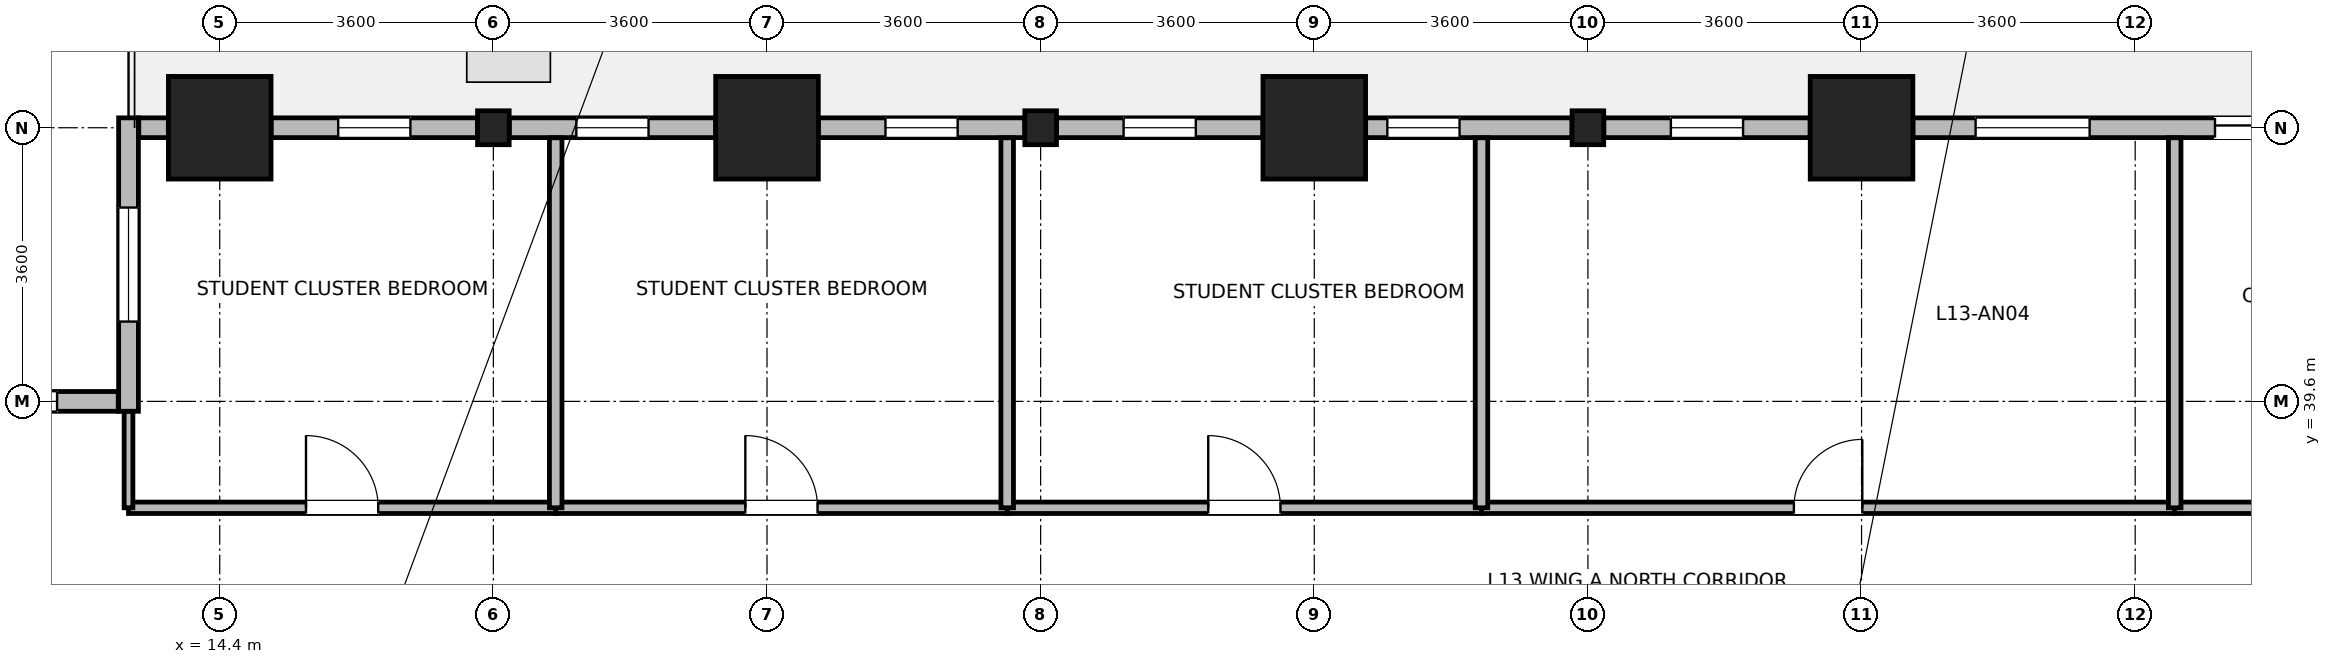
"""IFC4 building model, lengths in metres.
Left out: names, types, materials, properties, quantities, classifications, styles, units other than length and angle.
Written with IfcOpenShell. Run it as: python <this file> out.ifc"""

import sys

from ifc_helpers import new_model, si_unit, direction, frame, frame_2d, origin, origin_2d, place, context, subcontext, project, spatial, rectangle, i_section, extrude, source, transform, mapped, element, fill, save


model = new_model("IFC4")
c1 = context("Model", 3, precision=1e-05, world=origin(), true_north=direction((0.0, 1.0)))
c2 = subcontext(c1, "Body", "Model", "MODEL_VIEW")
j1 = project(units=[si_unit("LENGTHUNIT", "METRE"), si_unit("PLANEANGLEUNIT", "RADIAN")], contexts=[c1])
p1 = place(None, origin())
s1 = spatial("IfcSite", under=j1, at=p1, CompositionType="ELEMENT")
p2 = place(p1, origin())
s2 = spatial("IfcBuilding", under=s1, at=p2, CompositionType="ELEMENT")
p3 = place(p2, frame((0.0, 0.0, 54.9)))
s3 = spatial("IfcBuildingStorey", under=s2, at=p3, CompositionType="ELEMENT", Elevation=54.9)
m1 = source(origin(), c2, "Body", "SweptSolid", [
    extrude(rectangle(XDim=1.35, YDim=1.35, at=origin_2d()), origin(), (0.0, 0.0, 1.0), 3.7),
])
for number, where, z_axis, x_axis in (
    (1, (14.4, 43.2, 0.0), (0.0, 0.0, 1.0), (1.0, 0.0, 0.0)),
    (2, (21.6, 43.2, 0.0), (0.0, 0.0, 1.0), (1.0, 0.0, 0.0)),
    (3, (28.8, 43.2, 0.0), (0.0, 0.0, 1.0), (1.0, 0.0, 0.0)),
    (4, (36.0, 43.2, 0.0), (0.0, 0.0, 1.0), (1.0, 0.0, 0.0)),
):
    element("IfcColumn", number, at=place(p3, frame(where, z_axis=z_axis, x_axis=x_axis)), inside=s3, PredefinedType="COLUMN", context=c2, shape_type="MappedRepresentation", body=[
        mapped(m1, transform((0.0, 0.0, 0.0), x_axis=(1.0, 0.0, 0.0), y_axis=(0.0, 1.0, 0.0), z_axis=(0.0, 0.0, 1.0), scale=1.0)),
    ])
m2 = source(origin(), c2, "Body", "SweptSolid", [
    extrude(i_section(OverallWidth=0.416, OverallDepth=0.446, WebThickness=0.029, FlangeThickness=0.04, FilletRadius=0.015, at=origin_2d()), origin(), (0.0, 0.0, 1.0), 3.7),
])
for number, where, z_axis, x_axis in (
    (5, (18.0, 43.2, 0.0), (0.0, 0.0, 1.0), (1.0, 0.0, 0.0)),
    (6, (25.2, 43.2, 0.0), (0.0, 0.0, 1.0), (1.0, 0.0, 0.0)),
    (7, (32.4, 43.2, 0.0), (0.0, 0.0, 1.0), (1.0, 0.0, 0.0)),
):
    element("IfcColumn", number, at=place(p3, frame(where, z_axis=z_axis, x_axis=x_axis)), inside=s3, PredefinedType="COLUMN", context=c2, shape_type="MappedRepresentation", body=[
        mapped(m2, transform((0.0, 0.0, 0.0), x_axis=(1.0, 0.0, 0.0), y_axis=(0.0, 1.0, 0.0), z_axis=(0.0, 0.0, 1.0), scale=1.0)),
    ])
p4 = place(p3, frame((36.676, 43.2, 0.0), z_axis=(0.0, 0.0, 1.0), x_axis=(1.0, 0.0, 0.0)))
e8 = element("IfcWall", 8, at=p4, inside=s3, PredefinedType="STANDARD", context=c2, shape_type="SweptSolid", body=[
    extrude(rectangle(XDim=9.448, YDim=0.26, at=frame_2d((4.724, 0.0))), origin(), (0.0, 0.0, 1.0), 2.93),
])
p5 = place(p4, frame((3.974, 0.0, 0.0)))
e9 = element("IfcOpeningElement", 9, at=p5, cuts=e8, PredefinedType="OPENING", context=c2, shape_type="SweptSolid", body=[
    extrude(rectangle(XDim=1.5, YDim=2.15, at=frame_2d((0.75, 1.075))), frame((0.0, 0.14, 0.0), z_axis=(0.0, -1.0, 0.0), x_axis=(1.0, 0.0, 0.0)), (0.0, 0.0, 1.0), 0.28),
])
p6 = place(p4, frame((0.825, 0.0, 0.85)))
e10 = element("IfcOpeningElement", 10, at=p6, cuts=e8, PredefinedType="OPENING", context=c2, shape_type="SweptSolid", body=[
    extrude(rectangle(XDim=1.5, YDim=1.85, at=frame_2d((0.75, 0.925))), frame((0.0, 0.14, 0.0), z_axis=(0.0, -1.0, 0.0), x_axis=(1.0, 0.0, 0.0)), (0.0, 0.0, 1.0), 0.28),
])
p7 = place(p4, frame((7.123, 0.0, 0.85)))
e11 = element("IfcOpeningElement", 11, at=p7, cuts=e8, PredefinedType="OPENING", context=c2, shape_type="SweptSolid", body=[
    extrude(rectangle(XDim=1.5, YDim=1.85, at=frame_2d((0.75, 0.925))), frame((0.0, 0.14, 0.0), z_axis=(0.0, -1.0, 0.0), x_axis=(1.0, 0.0, 0.0)), (0.0, 0.0, 1.0), 0.28),
])
p8 = place(p3, frame((32.609, 43.2, 0.0), z_axis=(0.0, 0.0, 1.0), x_axis=(1.0, 0.0, 0.0)))
e12 = element("IfcWall", 12, at=p8, inside=s3, PredefinedType="STANDARD", context=c2, shape_type="SweptSolid", body=[
    extrude(rectangle(XDim=2.715, YDim=0.26, at=frame_2d((1.357, 0.0))), origin(), (0.0, 0.0, 1.0), 2.93),
])
p9 = place(p8, frame((0.883, 0.0, 0.85)))
e13 = element("IfcOpeningElement", 13, at=p9, cuts=e12, PredefinedType="OPENING", context=c2, shape_type="SweptSolid", body=[
    extrude(rectangle(XDim=0.95, YDim=1.75, at=frame_2d((0.475, 0.875))), frame((0.0, 0.14, 0.0), z_axis=(0.0, -1.0, 0.0), x_axis=(1.0, 0.0, 0.0)), (0.0, 0.0, 1.0), 0.28),
])
p10 = place(p3, frame((29.476, 43.2, 0.0), z_axis=(0.0, 0.0, 1.0), x_axis=(1.0, 0.0, 0.0)))
e14 = element("IfcWall", 14, at=p10, inside=s3, PredefinedType="STANDARD", context=c2, shape_type="SweptSolid", body=[
    extrude(rectangle(XDim=2.715, YDim=0.26, at=frame_2d((1.357, 0.0))), origin(), (0.0, 0.0, 1.0), 2.93),
])
p11 = place(p10, frame((0.285, 0.0, 0.85)))
e15 = element("IfcOpeningElement", 15, at=p11, cuts=e14, PredefinedType="OPENING", context=c2, shape_type="SweptSolid", body=[
    extrude(rectangle(XDim=0.95, YDim=1.75, at=frame_2d((0.475, 0.875))), frame((0.0, 0.14, 0.0), z_axis=(0.0, -1.0, 0.0), x_axis=(1.0, 0.0, 0.0)), (0.0, 0.0, 1.0), 0.28),
])
p12 = place(p3, frame((25.409, 43.2, 0.0), z_axis=(0.0, 0.0, 1.0), x_axis=(1.0, 0.0, 0.0)))
e16 = element("IfcWall", 16, at=p12, inside=s3, PredefinedType="STANDARD", context=c2, shape_type="SweptSolid", body=[
    extrude(rectangle(XDim=2.715, YDim=0.26, at=frame_2d((1.357, 0.0))), origin(), (0.0, 0.0, 1.0), 2.93),
])
p13 = place(p12, frame((0.883, 0.0, 0.85)))
e17 = element("IfcOpeningElement", 17, at=p13, cuts=e16, PredefinedType="OPENING", context=c2, shape_type="SweptSolid", body=[
    extrude(rectangle(XDim=0.95, YDim=1.75, at=frame_2d((0.475, 0.875))), frame((0.0, 0.14, 0.0), z_axis=(0.0, -1.0, 0.0), x_axis=(1.0, 0.0, 0.0)), (0.0, 0.0, 1.0), 0.28),
])
p14 = place(p3, frame((22.276, 43.2, 0.0), z_axis=(0.0, 0.0, 1.0), x_axis=(1.0, 0.0, 0.0)))
e18 = element("IfcWall", 18, at=p14, inside=s3, PredefinedType="STANDARD", context=c2, shape_type="SweptSolid", body=[
    extrude(rectangle(XDim=2.715, YDim=0.26, at=frame_2d((1.357, 0.0))), origin(), (0.0, 0.0, 1.0), 2.93),
])
p15 = place(p14, frame((0.883, 0.0, 0.85)))
e19 = element("IfcOpeningElement", 19, at=p15, cuts=e18, PredefinedType="OPENING", context=c2, shape_type="SweptSolid", body=[
    extrude(rectangle(XDim=0.95, YDim=1.75, at=frame_2d((0.475, 0.875))), frame((0.0, 0.14, 0.0), z_axis=(0.0, -1.0, 0.0), x_axis=(1.0, 0.0, 0.0)), (0.0, 0.0, 1.0), 0.28),
])
p16 = place(p3, frame((18.209, 43.2, 0.0), z_axis=(0.0, 0.0, 1.0), x_axis=(1.0, 0.0, 0.0)))
e20 = element("IfcWall", 20, at=p16, inside=s3, PredefinedType="STANDARD", context=c2, shape_type="SweptSolid", body=[
    extrude(rectangle(XDim=2.715, YDim=0.26, at=frame_2d((1.357, 0.0))), origin(), (0.0, 0.0, 1.0), 2.93),
])
p17 = place(p16, frame((0.883, 0.0, 0.85)))
e21 = element("IfcOpeningElement", 21, at=p17, cuts=e20, PredefinedType="OPENING", context=c2, shape_type="SweptSolid", body=[
    extrude(rectangle(XDim=0.95, YDim=1.75, at=frame_2d((0.475, 0.875))), frame((0.0, 0.14, 0.0), z_axis=(0.0, -1.0, 0.0), x_axis=(1.0, 0.0, 0.0)), (0.0, 0.0, 1.0), 0.28),
])
p18 = place(p3, frame((15.076, 43.2, 0.0), z_axis=(0.0, 0.0, 1.0), x_axis=(1.0, 0.0, 0.0)))
e22 = element("IfcWall", 22, at=p18, inside=s3, PredefinedType="STANDARD", context=c2, shape_type="SweptSolid", body=[
    extrude(rectangle(XDim=2.715, YDim=0.26, at=frame_2d((1.357, 0.0))), origin(), (0.0, 0.0, 1.0), 2.93),
])
p19 = place(p18, frame((0.883, 0.0, 0.85)))
e23 = element("IfcOpeningElement", 23, at=p19, cuts=e22, PredefinedType="OPENING", context=c2, shape_type="SweptSolid", body=[
    extrude(rectangle(XDim=0.95, YDim=1.75, at=frame_2d((0.475, 0.875))), frame((0.0, 0.14, 0.0), z_axis=(0.0, -1.0, 0.0), x_axis=(1.0, 0.0, 0.0)), (0.0, 0.0, 1.0), 0.28),
])
p20 = place(p3, frame((13.335, 43.2, 0.0), z_axis=(0.0, 0.0, 1.0), x_axis=(1.0, 0.0, 0.0)))
e24 = element("IfcWall", 24, at=p20, inside=s3, PredefinedType="STANDARD", context=c2, shape_type="SweptSolid", body=[
    extrude(rectangle(XDim=0.389, YDim=0.26, at=frame_2d((0.195, 0.0))), origin(), (0.0, 0.0, 1.0), 3.43),
])
p21 = place(p3, frame((13.2, 39.47, 0.0), z_axis=(0.0, 0.0, 1.0), x_axis=(0.0, 1.0, 0.0)))
e25 = element("IfcWall", 25, at=p21, inside=s3, PredefinedType="STANDARD", context=c2, shape_type="SweptSolid", body=[
    extrude(rectangle(XDim=3.86, YDim=0.26, at=frame_2d((1.93, 0.0))), origin(), (0.0, 0.0, 1.0), 3.43),
])
p22 = place(p21, frame((1.18, 0.0, 0.85)))
e26 = element("IfcOpeningElement", 26, at=p22, cuts=e25, PredefinedType="OPENING", context=c2, shape_type="SweptSolid", body=[
    extrude(rectangle(XDim=1.5, YDim=1.85, at=frame_2d((0.75, 0.925))), frame((0.0, 0.14, 0.0), z_axis=(0.0, -1.0, 0.0), x_axis=(1.0, 0.0, 0.0)), (0.0, 0.0, 1.0), 0.28),
])
p23 = place(p3, frame((3.735, 39.6, 0.0), z_axis=(0.0, 0.0, 1.0), x_axis=(1.0, 0.0, 0.0)))
e27 = element("IfcWall", 27, at=p23, inside=s3, PredefinedType="STANDARD", context=c2, shape_type="SweptSolid", body=[
    extrude(rectangle(XDim=9.33, YDim=0.26, at=frame_2d((4.665, 0.0))), origin(), (0.0, 0.0, 1.0), 3.43),
])
p24 = place(p23, frame((0.805, 0.0, 0.85)))
e28 = element("IfcOpeningElement", 28, at=p24, cuts=e27, PredefinedType="OPENING", context=c2, shape_type="SweptSolid", body=[
    extrude(rectangle(XDim=1.5, YDim=1.85, at=frame_2d((0.75, 0.925))), frame((0.0, 0.14, 0.0), z_axis=(0.0, -1.0, 0.0), x_axis=(1.0, 0.0, 0.0)), (0.0, 0.0, 1.0), 0.28),
])
p25 = place(p23, frame((3.915, 0.0, 0.85)))
e29 = element("IfcOpeningElement", 29, at=p25, cuts=e27, PredefinedType="OPENING", context=c2, shape_type="SweptSolid", body=[
    extrude(rectangle(XDim=1.5, YDim=1.85, at=frame_2d((0.75, 0.925))), frame((0.0, 0.14, 0.0), z_axis=(0.0, -1.0, 0.0), x_axis=(1.0, 0.0, 0.0)), (0.0, 0.0, 1.0), 0.28),
])
p26 = place(p23, frame((7.025, 0.0, 0.85)))
e30 = element("IfcOpeningElement", 30, at=p26, cuts=e27, PredefinedType="OPENING", context=c2, shape_type="SweptSolid", body=[
    extrude(rectangle(XDim=1.5, YDim=1.85, at=frame_2d((0.75, 0.925))), frame((0.0, 0.14, 0.0), z_axis=(0.0, -1.0, 0.0), x_axis=(1.0, 0.0, 0.0)), (0.0, 0.0, 1.0), 0.28),
])
p27 = place(p3, frame((31.0, 38.2, 0.0), z_axis=(0.0, 0.0, 1.0), x_axis=(1.0, 0.0, 0.0)))
e31 = element("IfcWall", 31, at=p27, inside=s3, PredefinedType="PARTITIONING", context=c2, shape_type="SweptSolid", body=[
    extrude(rectangle(XDim=9.12, YDim=0.15, at=frame_2d((4.56, 0.0))), origin(), (0.0, 0.0, 1.0), 3.43),
])
p28 = place(p27, frame((4.11, 0.0, 0.0)))
e32 = element("IfcOpeningElement", 32, at=p28, cuts=e31, PredefinedType="OPENING", context=c2, shape_type="SweptSolid", body=[
    extrude(rectangle(XDim=0.9, YDim=2.08, at=frame_2d((0.45, 1.04))), frame((0.0, 0.085, 0.0), z_axis=(0.0, -1.0, 0.0), x_axis=(1.0, 0.0, 0.0)), (0.0, 0.0, 1.0), 0.17),
])
p29 = place(p3, frame((24.76, 38.2, 0.0), z_axis=(0.0, 0.0, 1.0), x_axis=(1.0, 0.0, 0.0)))
e33 = element("IfcWall", 33, at=p29, inside=s3, PredefinedType="PARTITIONING", context=c2, shape_type="SweptSolid", body=[
    extrude(rectangle(XDim=6.24, YDim=0.15, at=frame_2d((3.12, 0.0))), origin(), (0.0, 0.0, 1.0), 3.43),
])
p30 = place(p29, frame((2.645, 0.0, 0.0)))
e34 = element("IfcOpeningElement", 34, at=p30, cuts=e33, PredefinedType="OPENING", context=c2, shape_type="SweptSolid", body=[
    extrude(rectangle(XDim=0.95, YDim=2.1, at=frame_2d((0.475, 1.05))), frame((0.0, 0.085, 0.0), z_axis=(0.0, -1.0, 0.0), x_axis=(1.0, 0.0, 0.0)), (0.0, 0.0, 1.0), 0.17),
])
p31 = place(p3, frame((40.12, 38.2, 0.0), z_axis=(0.0, 0.0, 1.0), x_axis=(1.0, 0.0, 0.0)))
e35 = element("IfcWall", 35, at=p31, inside=s3, PredefinedType="PARTITIONING", context=c2, shape_type="SweptSolid", body=[
    extrude(rectangle(XDim=6.04, YDim=0.15, at=frame_2d((3.02, 0.0))), origin(), (0.0, 0.0, 1.0), 3.43),
])
p32 = place(p31, frame((2.37, 0.0, 0.0)))
e36 = element("IfcOpeningElement", 36, at=p32, cuts=e35, PredefinedType="OPENING", context=c2, shape_type="SweptSolid", body=[
    extrude(rectangle(XDim=1.3, YDim=2.12, at=frame_2d((0.65, 1.06))), frame((0.0, 0.085, 0.0), z_axis=(0.0, -1.0, 0.0), x_axis=(1.0, 0.0, 0.0)), (0.0, 0.0, 1.0), 0.17),
])
p33 = place(p3, frame((18.82, 38.2, 0.0), z_axis=(0.0, 0.0, 1.0), x_axis=(1.0, 0.0, 0.0)))
e37 = element("IfcWall", 37, at=p33, inside=s3, PredefinedType="PARTITIONING", context=c2, shape_type="SweptSolid", body=[
    extrude(rectangle(XDim=5.94, YDim=0.15, at=frame_2d((2.97, 0.0))), origin(), (0.0, 0.0, 1.0), 3.43),
])
p34 = place(p33, frame((2.495, 0.0, 0.0)))
e38 = element("IfcOpeningElement", 38, at=p34, cuts=e37, PredefinedType="OPENING", context=c2, shape_type="SweptSolid", body=[
    extrude(rectangle(XDim=0.95, YDim=2.1, at=frame_2d((0.475, 1.05))), frame((0.0, 0.085, 0.0), z_axis=(0.0, -1.0, 0.0), x_axis=(1.0, 0.0, 0.0)), (0.0, 0.0, 1.0), 0.17),
])
p35 = place(p3, frame((13.2, 38.2, 0.0), z_axis=(0.0, 0.0, 1.0), x_axis=(1.0, 0.0, 0.0)))
e39 = element("IfcWall", 39, at=p35, inside=s3, PredefinedType="PARTITIONING", context=c2, shape_type="SweptSolid", body=[
    extrude(rectangle(XDim=5.62, YDim=0.15, at=frame_2d((2.81, 0.0))), origin(), (0.0, 0.0, 1.0), 3.43),
])
p36 = place(p35, frame((2.335, 0.0, 0.0)))
e40 = element("IfcOpeningElement", 40, at=p36, cuts=e39, PredefinedType="OPENING", context=c2, shape_type="SweptSolid", body=[
    extrude(rectangle(XDim=0.95, YDim=2.1, at=frame_2d((0.475, 1.05))), frame((0.0, 0.085, 0.0), z_axis=(0.0, -1.0, 0.0), x_axis=(1.0, 0.0, 0.0)), (0.0, 0.0, 1.0), 0.17),
])
p37 = place(p3, frame((13.2, 38.2, 0.0), z_axis=(0.0, 0.0, 1.0), x_axis=(0.0, 1.0, 0.0)))
e41 = element("IfcWall", 41, at=p37, inside=s3, PredefinedType="PARTITIONING", context=c2, shape_type="SweptSolid", body=[
    extrude(rectangle(XDim=1.268, YDim=0.115, at=frame_2d((0.634, 0.0))), origin(), (0.0, 0.0, 1.0), 3.43),
])
for number, where, z_axis, x_axis in (
    (42, (18.82, 38.2, 0.0), (0.0, 0.0, 1.0), (0.0, 1.0, 0.0)),
    (43, (24.76, 38.2, 0.0), (0.0, 0.0, 1.0), (0.0, 1.0, 0.0)),
    (44, (31.0, 38.2, 0.0), (0.0, 0.0, 1.0), (0.0, 1.0, 0.0)),
    (45, (40.12, 38.2, 0.0), (0.0, 0.0, 1.0), (0.0, 1.0, 0.0)),
):
    element("IfcWall", number, at=place(p3, frame(where, z_axis=z_axis, x_axis=x_axis)), inside=s3, PredefinedType="PARTITIONING", context=c2, shape_type="SweptSolid", body=[
        extrude(rectangle(XDim=4.868, YDim=0.165, at=frame_2d((2.434, 0.0))), origin(), (0.0, 0.0, 1.0), 3.43),
    ])
p38 = place(p5, origin())
e46 = element("IfcDoor", 46, at=p38, inside=s3, OperationType="SLIDING_TO_LEFT", PredefinedType="DOOR", context=c2, shape_type="SweptSolid", body=[
    extrude(rectangle(XDim=1.5, YDim=2.15, at=frame_2d((0.75, 1.075))), frame((0.0, 0.025, 0.0), z_axis=(0.0, -1.0, 0.0), x_axis=(1.0, 0.0, 0.0)), (0.0, 0.0, 1.0), 0.05),
])
fill(e9, e46)
p39 = place(p6, origin())
e47 = element("IfcWindow", 47, at=p39, inside=s3, PartitioningType="SINGLE_PANEL", PredefinedType="WINDOW", context=c2, shape_type="SweptSolid", body=[
    extrude(rectangle(XDim=1.5, YDim=1.85, at=frame_2d((0.75, 0.925))), frame((0.0, 0.03, 0.0), z_axis=(0.0, -1.0, 0.0), x_axis=(1.0, 0.0, 0.0)), (0.0, 0.0, 1.0), 0.06),
])
fill(e10, e47)
p40 = place(p9, origin())
e48 = element("IfcWindow", 48, at=p40, inside=s3, PartitioningType="SINGLE_PANEL", PredefinedType="WINDOW", context=c2, shape_type="SweptSolid", body=[
    extrude(rectangle(XDim=0.95, YDim=1.75, at=frame_2d((0.475, 0.875))), frame((0.0, 0.03, 0.0), z_axis=(0.0, -1.0, 0.0), x_axis=(1.0, 0.0, 0.0)), (0.0, 0.0, 1.0), 0.06),
])
fill(e13, e48)
p41 = place(p11, origin())
e49 = element("IfcWindow", 49, at=p41, inside=s3, PartitioningType="SINGLE_PANEL", PredefinedType="WINDOW", context=c2, shape_type="SweptSolid", body=[
    extrude(rectangle(XDim=0.95, YDim=1.75, at=frame_2d((0.475, 0.875))), frame((0.0, 0.03, 0.0), z_axis=(0.0, -1.0, 0.0), x_axis=(1.0, 0.0, 0.0)), (0.0, 0.0, 1.0), 0.06),
])
fill(e15, e49)
p42 = place(p13, origin())
e50 = element("IfcWindow", 50, at=p42, inside=s3, PartitioningType="SINGLE_PANEL", PredefinedType="WINDOW", context=c2, shape_type="SweptSolid", body=[
    extrude(rectangle(XDim=0.95, YDim=1.75, at=frame_2d((0.475, 0.875))), frame((0.0, 0.03, 0.0), z_axis=(0.0, -1.0, 0.0), x_axis=(1.0, 0.0, 0.0)), (0.0, 0.0, 1.0), 0.06),
])
fill(e17, e50)
p43 = place(p15, origin())
e51 = element("IfcWindow", 51, at=p43, inside=s3, PartitioningType="SINGLE_PANEL", PredefinedType="WINDOW", context=c2, shape_type="SweptSolid", body=[
    extrude(rectangle(XDim=0.95, YDim=1.75, at=frame_2d((0.475, 0.875))), frame((0.0, 0.03, 0.0), z_axis=(0.0, -1.0, 0.0), x_axis=(1.0, 0.0, 0.0)), (0.0, 0.0, 1.0), 0.06),
])
fill(e19, e51)
p44 = place(p17, origin())
e52 = element("IfcWindow", 52, at=p44, inside=s3, PartitioningType="SINGLE_PANEL", PredefinedType="WINDOW", context=c2, shape_type="SweptSolid", body=[
    extrude(rectangle(XDim=0.95, YDim=1.75, at=frame_2d((0.475, 0.875))), frame((0.0, 0.03, 0.0), z_axis=(0.0, -1.0, 0.0), x_axis=(1.0, 0.0, 0.0)), (0.0, 0.0, 1.0), 0.06),
])
fill(e21, e52)
p45 = place(p19, origin())
e53 = element("IfcWindow", 53, at=p45, inside=s3, PartitioningType="SINGLE_PANEL", PredefinedType="WINDOW", context=c2, shape_type="SweptSolid", body=[
    extrude(rectangle(XDim=0.95, YDim=1.75, at=frame_2d((0.475, 0.875))), frame((0.0, 0.03, 0.0), z_axis=(0.0, -1.0, 0.0), x_axis=(1.0, 0.0, 0.0)), (0.0, 0.0, 1.0), 0.06),
])
fill(e23, e53)
p46 = place(p22, origin())
e54 = element("IfcWindow", 54, at=p46, inside=s3, PartitioningType="SINGLE_PANEL", PredefinedType="WINDOW", context=c2, shape_type="SweptSolid", body=[
    extrude(rectangle(XDim=1.5, YDim=1.85, at=frame_2d((0.75, 0.925))), frame((0.0, 0.03, 0.0), z_axis=(0.0, -1.0, 0.0), x_axis=(1.0, 0.0, 0.0)), (0.0, 0.0, 1.0), 0.06),
])
fill(e26, e54)
p47 = place(p26, origin())
e55 = element("IfcWindow", 55, at=p47, inside=s3, PartitioningType="SINGLE_PANEL", PredefinedType="WINDOW", context=c2, shape_type="SweptSolid", body=[
    extrude(rectangle(XDim=1.5, YDim=1.85, at=frame_2d((0.75, 0.925))), frame((0.0, 0.03, 0.0), z_axis=(0.0, -1.0, 0.0), x_axis=(1.0, 0.0, 0.0)), (0.0, 0.0, 1.0), 0.06),
])
fill(e30, e55)
p48 = place(p28, origin())
e56 = element("IfcDoor", 56, at=p48, inside=s3, OperationType="SINGLE_SWING_RIGHT", PredefinedType="DOOR", context=c2, shape_type="SweptSolid", body=[
    extrude(rectangle(XDim=0.9, YDim=2.08, at=frame_2d((0.45, 1.04))), frame((0.0, 0.025, 0.0), z_axis=(0.0, -1.0, 0.0), x_axis=(1.0, 0.0, 0.0)), (0.0, 0.0, 1.0), 0.05),
])
fill(e32, e56)
p49 = place(p30, origin())
e57 = element("IfcDoor", 57, at=p49, inside=s3, OperationType="SINGLE_SWING_LEFT", PredefinedType="DOOR", context=c2, shape_type="SweptSolid", body=[
    extrude(rectangle(XDim=0.95, YDim=2.1, at=frame_2d((0.475, 1.05))), frame((0.0, 0.025, 0.0), z_axis=(0.0, -1.0, 0.0), x_axis=(1.0, 0.0, 0.0)), (0.0, 0.0, 1.0), 0.05),
])
fill(e34, e57)
p50 = place(p34, origin())
e58 = element("IfcDoor", 58, at=p50, inside=s3, OperationType="SINGLE_SWING_LEFT", PredefinedType="DOOR", context=c2, shape_type="SweptSolid", body=[
    extrude(rectangle(XDim=0.95, YDim=2.1, at=frame_2d((0.475, 1.05))), frame((0.0, 0.025, 0.0), z_axis=(0.0, -1.0, 0.0), x_axis=(1.0, 0.0, 0.0)), (0.0, 0.0, 1.0), 0.05),
])
fill(e38, e58)
p51 = place(p36, origin())
e59 = element("IfcDoor", 59, at=p51, inside=s3, OperationType="SINGLE_SWING_LEFT", PredefinedType="DOOR", context=c2, shape_type="SweptSolid", body=[
    extrude(rectangle(XDim=0.95, YDim=2.1, at=frame_2d((0.475, 1.05))), frame((0.0, 0.025, 0.0), z_axis=(0.0, -1.0, 0.0), x_axis=(1.0, 0.0, 0.0)), (0.0, 0.0, 1.0), 0.05),
])
fill(e40, e59)
save(model, sys.argv[1])
